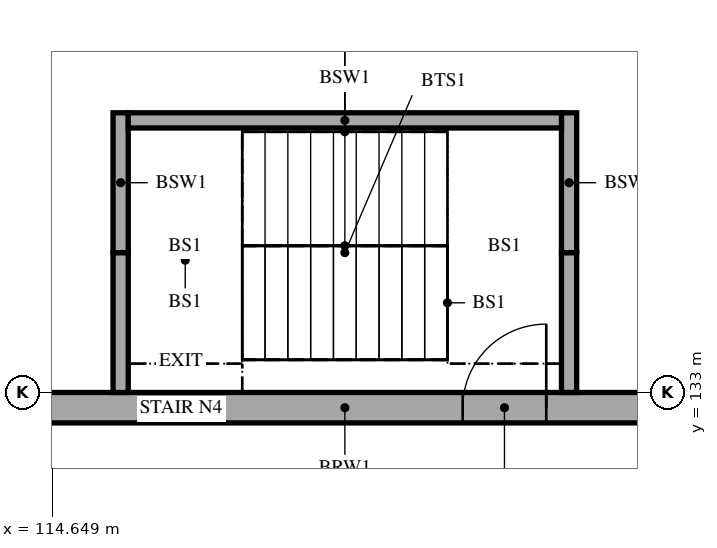
"""IFC4 building model, lengths in metres.
Left out: names, types, materials, properties, quantities, classifications, styles, units other than length and angle.
Written with IfcOpenShell. Run it as: python <this file> out.ifc"""

import sys

from ifc_helpers import new_model, si_unit, direction, frame, frame_2d, origin, place, context, subcontext, project, spatial, rectangle, extrude, element, fill, save


model = new_model("IFC4")
c1 = context("Model", 3, precision=1e-05, world=origin(), true_north=direction((0.0, 1.0)))
c2 = subcontext(c1, "Body", "Model", "MODEL_VIEW")
j1 = project(units=[si_unit("LENGTHUNIT", "METRE"), si_unit("PLANEANGLEUNIT", "RADIAN")], contexts=[c1])
p1 = place(None, origin())
s1 = spatial("IfcSite", under=j1, at=p1, CompositionType="ELEMENT")
p2 = place(p1, origin())
s2 = spatial("IfcBuilding", under=s1, at=p2, CompositionType="ELEMENT")
p3 = place(p2, frame((0.0, 0.0, -8.4)))
s3 = spatial("IfcBuildingStorey", under=s2, at=p3, CompositionType="ELEMENT", Elevation=-8.4)
p4 = place(p3, frame((114.4, 132.8, 0.0), z_axis=(0.0, 0.0, 1.0), x_axis=(1.0, 0.0, 0.0)))
e1 = element("IfcWall", 1, at=p4, inside=s3, PredefinedType="SOLIDWALL", context=c2, shape_type="SweptSolid", body=[
    extrude(rectangle(XDim=8.2, YDim=0.4, at=frame_2d((4.1, 0.0))), origin(), (0.0, 0.0, 1.0), 4.2),
])
p5 = place(p4, frame((5.65, 0.0, 0.0)))
e2 = element("IfcOpeningElement", 2, at=p5, cuts=e1, PredefinedType="OPENING", context=c2, shape_type="SweptSolid", body=[
    extrude(rectangle(XDim=1.1, YDim=2.1, at=frame_2d((0.55, 1.05))), frame((0.0, 0.21, 0.0), z_axis=(0.0, -1.0, 0.0), x_axis=(1.0, 0.0, 0.0)), (0.0, 0.0, 1.0), 0.42),
])
p6 = place(p3, frame((121.45, 133.0, 0.0), z_axis=(0.0, 0.0, 1.0), x_axis=(0.0, 1.0, 0.0)))
e3 = element("IfcWall", 3, at=p6, inside=s3, PredefinedType="SOLIDWALL", context=c2, shape_type="SweptSolid", body=[
    extrude(rectangle(XDim=1.84, YDim=0.2, at=frame_2d((0.92, 0.0))), origin(), (0.0, 0.0, 1.0), 4.2),
])
p7 = place(p3, frame((121.45, 134.84, 0.0), z_axis=(0.0, 0.0, 1.0), x_axis=(0.0, 1.0, 0.0)))
e4 = element("IfcWall", 4, at=p7, inside=s3, PredefinedType="SOLIDWALL", context=c2, shape_type="SweptSolid", body=[
    extrude(rectangle(XDim=1.84, YDim=0.2, at=frame_2d((0.92, 0.0))), origin(), (0.0, 0.0, 1.0), 4.2),
])
p8 = place(p3, frame((115.55, 133.0, 0.0), z_axis=(0.0, 0.0, 1.0), x_axis=(0.0, 1.0, 0.0)))
e5 = element("IfcWall", 5, at=p8, inside=s3, PredefinedType="SOLIDWALL", context=c2, shape_type="SweptSolid", body=[
    extrude(rectangle(XDim=1.84, YDim=0.2, at=frame_2d((0.92, 0.0))), origin(), (0.0, 0.0, 1.0), 4.2),
])
p9 = place(p3, frame((115.55, 134.84, 0.0), z_axis=(0.0, 0.0, 1.0), x_axis=(0.0, 1.0, 0.0)))
e6 = element("IfcWall", 6, at=p9, inside=s3, PredefinedType="SOLIDWALL", context=c2, shape_type="SweptSolid", body=[
    extrude(rectangle(XDim=1.84, YDim=0.2, at=frame_2d((0.92, 0.0))), origin(), (0.0, 0.0, 1.0), 4.2),
])
p10 = place(p3, frame((121.35, 136.58, 0.0), z_axis=(0.0, 0.0, 1.0), x_axis=(-1.0, 0.0, 0.0)))
e7 = element("IfcWall", 7, at=p10, inside=s3, PredefinedType="SOLIDWALL", context=c2, shape_type="SweptSolid", body=[
    extrude(rectangle(XDim=5.7, YDim=0.2, at=frame_2d((2.85, 0.0))), origin(), (0.0, 0.0, 1.0), 4.2),
])
p11 = place(p5, origin())
e8 = element("IfcDoor", 8, at=p11, inside=s3, OperationType="SINGLE_SWING_RIGHT", PredefinedType="DOOR", context=c2, shape_type="SweptSolid", body=[
    extrude(rectangle(XDim=1.1, YDim=2.1, at=frame_2d((0.55, 1.05))), frame((0.0, 0.025, 0.0), z_axis=(0.0, -1.0, 0.0), x_axis=(1.0, 0.0, 0.0)), (0.0, 0.0, 1.0), 0.05),
])
fill(e2, e8)
save(model, sys.argv[1])
